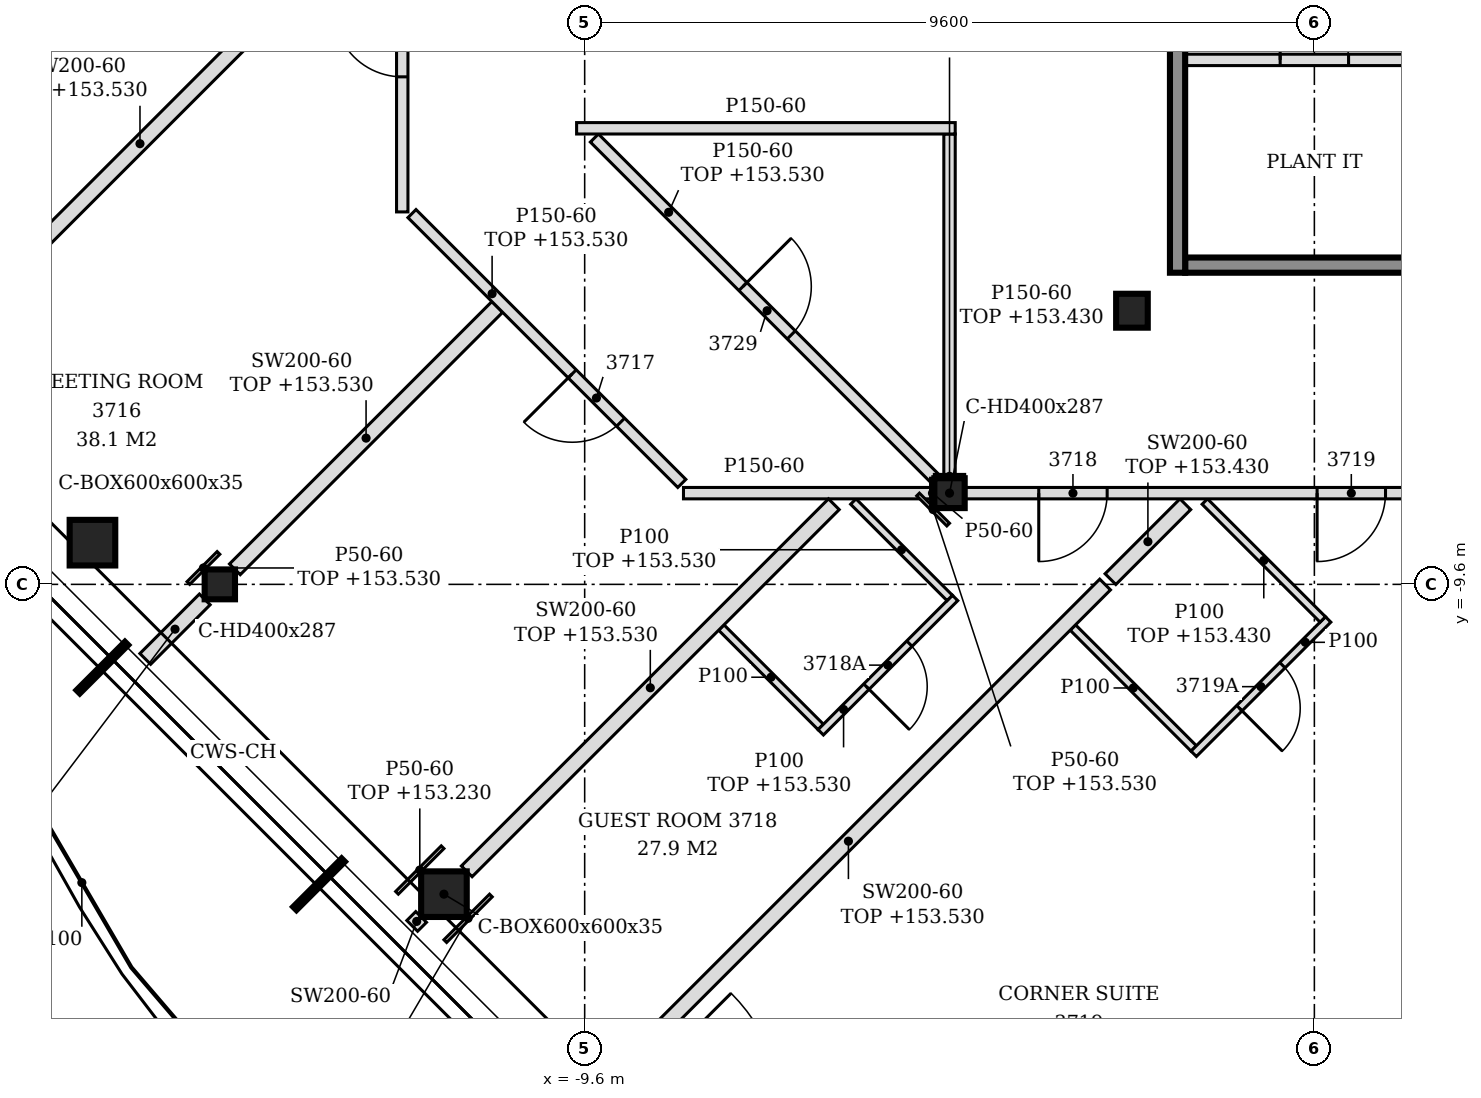
"""IFC4 building model, lengths in metres.
Left out: names, types, materials, properties, quantities, classifications, styles, units other than length and angle.
Written with IfcOpenShell. Run it as: python <this file> out.ifc"""

import sys

from ifc_helpers import new_model, si_unit, direction, frame, frame_2d, origin, origin_2d, place, context, subcontext, project, spatial, polyline, rectangle, hollow_rectangle, i_section, outline, extrude, element, fill, save


model = new_model("IFC4")
c1 = context("Model", 3, precision=1e-05, world=origin(), true_north=direction((0.0, 1.0)))
c2 = subcontext(c1, "Body", "Model", "MODEL_VIEW")
j1 = project(units=[si_unit("LENGTHUNIT", "METRE"), si_unit("PLANEANGLEUNIT", "RADIAN")], contexts=[c1])
p1 = place(None, origin())
s1 = spatial("IfcSite", under=j1, at=p1, CompositionType="ELEMENT")
p2 = place(p1, origin())
s2 = spatial("IfcBuilding", under=s1, at=p2, CompositionType="ELEMENT")
p3 = place(p2, frame((0.0, 0.0, 150.6)))
s3 = spatial("IfcBuildingStorey", under=s2, at=p3, CompositionType="ELEMENT", Elevation=150.6)
for number, where, z_axis, x_axis in (
    (1, (-16.076, -9.052, -0.15), (0.0, 0.0, 1.0), (1.0, 0.0, 0.0)),
    (2, (-11.451, -13.676, -0.15), (0.0, 0.0, 1.0), (1.0, 0.0, 0.0)),
):
    element("IfcColumn", number, at=place(p3, frame(where, z_axis=z_axis, x_axis=x_axis)), inside=s3, PredefinedType="COLUMN", context=c2, shape_type="SweptSolid", body=[
        extrude(hollow_rectangle(XDim=0.6, YDim=0.6, WallThickness=0.035, at=origin_2d()), origin(), (0.0, 0.0, 1.0), 3.6),
    ])
p4 = place(p3, frame((-4.8, -8.4, -0.15), z_axis=(0.0, 0.0, 1.0), x_axis=(1.0, 0.0, 0.0)))
e3 = element("IfcColumn", 3, at=p4, inside=s3, PredefinedType="COLUMN", context=c2, shape_type="SweptSolid", body=[
    extrude(i_section(OverallWidth=0.399, OverallDepth=0.393, WebThickness=0.023, FlangeThickness=0.037, FilletRadius=0.015, at=origin_2d()), origin(), (0.0, 0.0, 1.0), 3.6),
])
p5 = place(p3, frame((-2.4, -6.0, -0.15), z_axis=(0.0, 0.0, 1.0), x_axis=(1.0, 0.0, 0.0)))
e4 = element("IfcColumn", 4, at=p5, inside=s3, PredefinedType="COLUMN", context=c2, shape_type="SweptSolid", body=[
    extrude(i_section(OverallWidth=0.416, OverallDepth=0.446, WebThickness=0.039, FlangeThickness=0.063, FilletRadius=0.015, at=origin_2d()), origin(), (0.0, 0.0, 1.0), 3.6),
])
p6 = place(p3, frame((-14.4, -9.6, -0.15), z_axis=(0.0, 0.0, 1.0), x_axis=(1.0, 0.0, 0.0)))
e5 = element("IfcColumn", 5, at=p6, inside=s3, PredefinedType="COLUMN", context=c2, shape_type="SweptSolid", body=[
    extrude(i_section(OverallWidth=0.399, OverallDepth=0.393, WebThickness=0.023, FlangeThickness=0.037, FilletRadius=0.015, at=origin_2d()), origin(), (0.0, 0.0, 1.0), 3.6),
])
p7 = place(p3, frame((-1.7, -5.4, 0.0), z_axis=(0.0, 0.0, 1.0), x_axis=(1.0, 0.0, 0.0)))
e6 = element("IfcWall", 6, at=p7, inside=s3, PredefinedType="SOLIDWALL", context=c2, shape_type="SweptSolid", body=[
    extrude(rectangle(XDim=7.9, YDim=0.2, at=frame_2d((3.95, 0.0))), origin(), (0.0, 0.0, 1.0), 3.45),
])
p8 = place(p3, frame((-1.7, -2.7, 0.0), z_axis=(0.0, 0.0, 1.0), x_axis=(1.0, 0.0, 0.0)))
e7 = element("IfcWall", 7, at=p8, inside=s3, PredefinedType="PARTITIONING", context=c2, shape_type="SweptSolid", body=[
    extrude(rectangle(XDim=7.825, YDim=0.15, at=frame_2d((3.913, 0.0))), origin(), (0.0, 0.0, 1.0), 3.45),
])
p9 = place(p8, frame((1.25, 0.0, 0.0)))
e8 = element("IfcOpeningElement", 8, at=p9, cuts=e7, PredefinedType="OPENING", context=c2, shape_type="SweptSolid", body=[
    extrude(rectangle(XDim=0.9, YDim=2.1, at=frame_2d((0.45, 1.05))), frame((0.0, 0.085, 0.0), z_axis=(0.0, -1.0, 0.0), x_axis=(1.0, 0.0, 0.0)), (0.0, 0.0, 1.0), 0.17),
])
p10 = place(p8, frame((5.25, 0.0, 0.0)))
e9 = element("IfcOpeningElement", 9, at=p10, cuts=e7, PredefinedType="OPENING", context=c2, shape_type="SweptSolid", body=[
    extrude(rectangle(XDim=0.9, YDim=2.1, at=frame_2d((0.45, 1.05))), frame((0.0, 0.085, 0.0), z_axis=(0.0, -1.0, 0.0), x_axis=(1.0, 0.0, 0.0)), (0.0, 0.0, 1.0), 0.17),
])
p11 = place(p3, frame((-1.8, -5.5, 0.0), z_axis=(0.0, 0.0, 1.0), x_axis=(0.0, 1.0, 0.0)))
e10 = element("IfcWall", 10, at=p11, inside=s3, PredefinedType="SOLIDWALL", context=c2, shape_type="SweptSolid", body=[
    extrude(rectangle(XDim=15.8, YDim=0.2, at=frame_2d((7.9, 0.0))), origin(), (0.0, 0.0, 1.0), 3.45),
])
p12 = place(p11, frame((3.05, 0.0, 0.0)))
e11 = element("IfcOpeningElement", 11, at=p12, cuts=e10, PredefinedType="OPENING", context=c2, shape_type="SweptSolid", body=[
    extrude(rectangle(XDim=1.3, YDim=2.1, at=frame_2d((0.65, 1.05))), frame((0.0, 0.11, 0.0), z_axis=(0.0, -1.0, 0.0), x_axis=(1.0, 0.0, 0.0)), (0.0, 0.0, 1.0), 0.22),
])
p13 = place(p11, frame((11.45, 0.0, 0.0)))
e12 = element("IfcOpeningElement", 12, at=p13, cuts=e10, PredefinedType="OPENING", context=c2, shape_type="SweptSolid", body=[
    extrude(rectangle(XDim=1.3, YDim=2.1, at=frame_2d((0.65, 1.05))), frame((0.0, 0.11, 0.0), z_axis=(0.0, -1.0, 0.0), x_axis=(1.0, 0.0, 0.0)), (0.0, 0.0, 1.0), 0.22),
])
p14 = place(p3, frame((-9.507, -16.355, 0.0), z_axis=(0.0, 0.0, 1.0), x_axis=(0.707170680804, 0.707042875794, 0.0)))
e13 = element("IfcWall", 13, at=p14, inside=s3, PredefinedType="PARTITIONING", context=c2, shape_type="SweptSolid", body=[
    extrude(rectangle(XDim=9.551, YDim=0.2, at=frame_2d((4.776, 0.0))), origin(), (0.0, 0.0, 1.0), 2.93),
])
p15 = place(p3, frame((-11.869, -14.093, 0.0), z_axis=(0.0, 0.0, 1.0), x_axis=(0.707106781187, 0.707106781187, 0.0)))
e14 = element("IfcWall", 14, at=p15, inside=s3, PredefinedType="PARTITIONING", context=c2, shape_type="SweptSolid", body=[
    extrude(rectangle(XDim=0.166, YDim=0.2, at=frame_2d((0.083, 0.0))), origin(), (0.0, 0.0, 1.0), 3.45),
])
p16 = place(p3, frame((-11.152, -13.375, 0.0), z_axis=(0.0, 0.0, 1.0), x_axis=(0.707106781187, 0.707106781187, 0.0)))
e15 = element("IfcWall", 15, at=p16, inside=s3, PredefinedType="PARTITIONING", context=c2, shape_type="SweptSolid", body=[
    extrude(rectangle(XDim=6.83, YDim=0.2, at=frame_2d((3.415, 0.0))), origin(), (0.0, 0.0, 1.0), 2.93),
])
p17 = place(p3, frame((-1.587, -11.759, 0.0), z_axis=(0.0, 0.0, 1.0), x_axis=(-0.706889644159, 0.707323851557, 0.0)))
e16 = element("IfcWall", 16, at=p17, inside=s3, PredefinedType="PARTITIONING", context=c2, shape_type="SweptSolid", body=[
    extrude(rectangle(XDim=2.249, YDim=0.1, at=frame_2d((1.125, 0.0))), origin(), (0.0, 0.0, 1.0), 3.45),
])
p18 = place(p3, frame((-1.587, -11.829, 0.0), z_axis=(0.0, 0.0, 1.0), x_axis=(0.707350821469, 0.706862656651, 0.0)))
e17 = element("IfcWall", 17, at=p18, inside=s3, PredefinedType="PARTITIONING", context=c2, shape_type="SweptSolid", body=[
    extrude(rectangle(XDim=2.5, YDim=0.1, at=frame_2d((1.25, 0.0))), origin(), (0.0, 0.0, 1.0), 3.45),
])
p19 = place(p18, frame((0.85, 0.0, 0.0)))
e18 = element("IfcOpeningElement", 18, at=p19, cuts=e17, PredefinedType="OPENING", context=c2, shape_type="SweptSolid", body=[
    extrude(rectangle(XDim=0.8, YDim=2.1, at=frame_2d((0.4, 1.05))), frame((0.0, 0.06, 0.0), z_axis=(0.0, -1.0, 0.0), x_axis=(1.0, 0.0, 0.0)), (0.0, 0.0, 1.0), 0.12),
])
p20 = place(p3, frame((-6.494, -11.476, 0.0), z_axis=(0.0, 0.0, 1.0), x_axis=(-0.707106781187, 0.707106781187, 0.0)))
e19 = element("IfcWall", 19, at=p20, inside=s3, PredefinedType="PARTITIONING", context=c2, shape_type="SweptSolid", body=[
    extrude(rectangle(XDim=1.85, YDim=0.1, at=frame_2d((0.925, 0.0))), origin(), (0.0, 0.0, 1.0), 3.45),
])
p21 = place(p3, frame((-6.494, -11.546, 0.0), z_axis=(0.0, 0.0, 1.0), x_axis=(0.707106781187, 0.707106781187, 0.0)))
e20 = element("IfcWall", 20, at=p21, inside=s3, PredefinedType="PARTITIONING", context=c2, shape_type="SweptSolid", body=[
    extrude(rectangle(XDim=2.5, YDim=0.1, at=frame_2d((1.25, 0.0))), origin(), (0.0, 0.0, 1.0), 2.93),
])
p22 = place(p21, frame((0.85, 0.0, 0.0)))
e21 = element("IfcOpeningElement", 21, at=p22, cuts=e20, PredefinedType="OPENING", context=c2, shape_type="SweptSolid", body=[
    extrude(rectangle(XDim=0.8, YDim=2.1, at=frame_2d((0.4, 1.05))), frame((0.0, 0.06, 0.0), z_axis=(0.0, -1.0, 0.0), x_axis=(1.0, 0.0, 0.0)), (0.0, 0.0, 1.0), 0.12),
])
p23 = place(p3, frame((-15.381, -10.581, 0.0), z_axis=(0.0, 0.0, 1.0), x_axis=(0.707217034054, 0.706996511125, 0.0)))
e22 = element("IfcWall", 22, at=p23, inside=s3, PredefinedType="PARTITIONING", context=c2, shape_type="SweptSolid", body=[
    extrude(rectangle(XDim=1.107, YDim=0.2, at=frame_2d((0.554, 0.0))), origin(), (0.0, 0.0, 1.0), 2.63),
])
p24 = place(p3, frame((0.111, -10.062, 0.0), z_axis=(0.0, 0.0, 1.0), x_axis=(-0.70732924673, 0.706884245631, 0.0)))
e23 = element("IfcWall", 23, at=p24, inside=s3, PredefinedType="PARTITIONING", context=c2, shape_type="SweptSolid", body=[
    extrude(rectangle(XDim=2.195, YDim=0.1, at=frame_2d((1.097, 0.0))), origin(), (0.0, 0.0, 1.0), 2.83),
])
p25 = place(p3, frame((-4.797, -9.779, 0.0), z_axis=(0.0, 0.0, 1.0), x_axis=(-0.707174840937, 0.707038714885, 0.0)))
e24 = element("IfcWall", 24, at=p25, inside=s3, PredefinedType="PARTITIONING", context=c2, shape_type="SweptSolid", body=[
    extrude(rectangle(XDim=1.793, YDim=0.1, at=frame_2d((0.897, 0.0))), origin(), (0.0, 0.0, 1.0), 2.93),
])
p26 = place(p3, frame((-2.683, -9.531, 0.0), z_axis=(0.0, 0.0, 1.0), x_axis=(0.707019164958, 0.70719438656, 0.0)))
e25 = element("IfcWall", 25, at=p26, inside=s3, PredefinedType="PARTITIONING", context=c2, shape_type="SweptSolid", body=[
    extrude(rectangle(XDim=1.393, YDim=0.2, at=frame_2d((0.697, 0.0))), origin(), (0.0, 0.0, 1.0), 2.83),
])
p27 = place(p3, frame((-14.202, -9.402, 0.0), z_axis=(0.0, 0.0, 1.0), x_axis=(0.707081776084, 0.707131785404, 0.0)))
e26 = element("IfcWall", 26, at=p27, inside=s3, PredefinedType="PARTITIONING", context=c2, shape_type="SweptSolid", body=[
    extrude(rectangle(XDim=4.882, YDim=0.2, at=frame_2d((2.441, 0.0))), origin(), (0.0, 0.0, 1.0), 2.93),
])
p28 = place(p3, frame((-8.3, -8.4, 0.0), z_axis=(0.0, 0.0, 1.0), x_axis=(1.0, 0.0, 0.0)))
e27 = element("IfcWall", 27, at=p28, inside=s3, PredefinedType="PARTITIONING", context=c2, shape_type="SweptSolid", body=[
    extrude(rectangle(XDim=3.301, YDim=0.15, at=frame_2d((1.65, 0.0))), origin(), (0.0, 0.0, 1.0), 3.45),
])
p29 = place(p3, frame((-4.601, -8.4, 0.0), z_axis=(0.0, 0.0, 1.0), x_axis=(1.0, 0.0, 0.0)))
e28 = element("IfcWall", 28, at=p29, inside=s3, PredefinedType="PARTITIONING", context=c2, shape_type="SweptSolid", body=[
    extrude(rectangle(XDim=11.601, YDim=0.15, at=frame_2d((5.801, 0.0))), origin(), (0.0, 0.0, 1.0), 2.83),
])
p30 = place(p29, frame((0.974, 0.0, 0.0)))
e29 = element("IfcOpeningElement", 29, at=p30, cuts=e28, PredefinedType="OPENING", context=c2, shape_type="SweptSolid", body=[
    extrude(rectangle(XDim=0.9, YDim=2.1, at=frame_2d((0.45, 1.05))), frame((0.0, 0.085, 0.0), z_axis=(0.0, -1.0, 0.0), x_axis=(1.0, 0.0, 0.0)), (0.0, 0.0, 1.0), 0.17),
])
p31 = place(p29, frame((4.636, 0.0, 0.0)))
e30 = element("IfcOpeningElement", 30, at=p31, cuts=e28, PredefinedType="OPENING", context=c2, shape_type="SweptSolid", body=[
    extrude(rectangle(XDim=0.9, YDim=2.1, at=frame_2d((0.45, 1.05))), frame((0.0, 0.085, 0.0), z_axis=(0.0, -1.0, 0.0), x_axis=(1.0, 0.0, 0.0)), (0.0, 0.0, 1.0), 0.17),
])
p32 = place(p29, frame((8.592, 0.0, 0.0)))
e31 = element("IfcOpeningElement", 31, at=p32, cuts=e28, PredefinedType="OPENING", context=c2, shape_type="SweptSolid", body=[
    extrude(rectangle(XDim=0.9, YDim=2.1, at=frame_2d((0.45, 1.05))), frame((0.0, 0.085, 0.0), z_axis=(0.0, -1.0, 0.0), x_axis=(1.0, 0.0, 0.0)), (0.0, 0.0, 1.0), 0.17),
])
p33 = place(p3, frame((-8.322, -8.272, 0.0), z_axis=(0.0, 0.0, 1.0), x_axis=(-0.707106781187, 0.707106781187, 0.0)))
e32 = element("IfcWall", 32, at=p33, inside=s3, PredefinedType="PARTITIONING", context=c2, shape_type="SweptSolid", body=[
    extrude(rectangle(XDim=5.021, YDim=0.15, at=frame_2d((2.51, 0.0))), origin(), (0.0, 0.0, 1.0), 2.93),
])
p34 = place(p33, frame((1.139, 0.0, 0.0)))
e33 = element("IfcOpeningElement", 33, at=p34, cuts=e32, PredefinedType="OPENING", context=c2, shape_type="SweptSolid", body=[
    extrude(rectangle(XDim=0.9, YDim=2.1, at=frame_2d((0.45, 1.05))), frame((0.0, 0.085, 0.0), z_axis=(0.0, -1.0, 0.0), x_axis=(1.0, 0.0, 0.0)), (0.0, 0.0, 1.0), 0.17),
])
p35 = place(p3, frame((-4.998, -8.202, 0.0), z_axis=(0.0, 0.0, 1.0), x_axis=(-0.707106781187, 0.707106781187, 0.0)))
e34 = element("IfcWall", 34, at=p35, inside=s3, PredefinedType="PARTITIONING", context=c2, shape_type="SweptSolid", body=[
    extrude(rectangle(XDim=6.327, YDim=0.15, at=frame_2d((3.164, 0.0))), origin(), (0.0, 0.0, 1.0), 2.93),
])
p36 = place(p35, frame((2.664, 0.0, 0.0)))
e35 = element("IfcOpeningElement", 35, at=p36, cuts=e34, PredefinedType="OPENING", context=c2, shape_type="SweptSolid", body=[
    extrude(rectangle(XDim=0.9, YDim=2.1, at=frame_2d((0.45, 1.05))), frame((0.0, 0.085, 0.0), z_axis=(0.0, -1.0, 0.0), x_axis=(1.0, 0.0, 0.0)), (0.0, 0.0, 1.0), 0.17),
])
p37 = place(p3, frame((-4.8, -8.204, 0.0), z_axis=(0.0, 0.0, 1.0), x_axis=(0.0, 1.0, 0.0)))
e36 = element("IfcWall", 36, at=p37, inside=s3, PredefinedType="PARTITIONING", context=c2, shape_type="SweptSolid", body=[
    extrude(rectangle(XDim=4.529, YDim=0.15, at=frame_2d((2.264, 0.0))), origin(), (0.0, 0.0, 1.0), 2.83),
])
p38 = place(p3, frame((-18.755, -7.107, 0.0), z_axis=(0.0, 0.0, 1.0), x_axis=(0.707106781187, 0.707106781187, 0.0)))
e37 = element("IfcWall", 37, at=p38, inside=s3, PredefinedType="PARTITIONING", context=c2, shape_type="SweptSolid", body=[
    extrude(rectangle(XDim=9.347, YDim=0.2, at=frame_2d((4.674, 0.0))), origin(), (0.0, 0.0, 1.0), 2.93),
])
p39 = place(p3, frame((-12.0, -4.7, 0.0), z_axis=(0.0, 0.0, 1.0), x_axis=(0.0, 1.0, 0.0)))
e38 = element("IfcWall", 38, at=p39, inside=s3, PredefinedType="PARTITIONING", context=c2, shape_type="SweptSolid", body=[
    extrude(outline(polyline([(0.0, 0.0), (13.913, 0.0), (13.913, 3.45), (9.6, 3.45), (9.598, 2.93), (9.4, 2.93), (9.398, 3.45), (4.8, 3.45), (4.798, 2.93), (4.6, 2.93), (4.598, 3.45), (0.0, 3.45), (0.0, 0.0)])), frame((0.0, 0.075, 0.0), z_axis=(0.0, -1.0, 0.0), x_axis=(1.0, 0.0, 0.0)), (0.0, 0.0, 1.0), 0.15),
])
p40 = place(p39, frame((12.347, 0.0, 0.0)))
e39 = element("IfcOpeningElement", 39, at=p40, cuts=e38, PredefinedType="OPENING", context=c2, shape_type="SweptSolid", body=[
    extrude(rectangle(XDim=0.9, YDim=2.1, at=frame_2d((0.45, 1.05))), frame((0.0, 0.085, 0.0), z_axis=(0.0, -1.0, 0.0), x_axis=(1.0, 0.0, 0.0)), (0.0, 0.0, 1.0), 0.17),
])
p41 = place(p39, frame((5.45, 0.0, 0.0)))
e40 = element("IfcOpeningElement", 40, at=p41, cuts=e38, PredefinedType="OPENING", context=c2, shape_type="SweptSolid", body=[
    extrude(rectangle(XDim=0.9, YDim=2.1, at=frame_2d((0.45, 1.05))), frame((0.0, 0.085, 0.0), z_axis=(0.0, -1.0, 0.0), x_axis=(1.0, 0.0, 0.0)), (0.0, 0.0, 1.0), 0.17),
])
p42 = place(p39, frame((1.777, 0.0, 0.0)))
e41 = element("IfcOpeningElement", 41, at=p42, cuts=e38, PredefinedType="OPENING", context=c2, shape_type="SweptSolid", body=[
    extrude(rectangle(XDim=0.9, YDim=2.1, at=frame_2d((0.45, 1.05))), frame((0.0, 0.085, 0.0), z_axis=(0.0, -1.0, 0.0), x_axis=(1.0, 0.0, 0.0)), (0.0, 0.0, 1.0), 0.17),
])
p43 = place(p3, frame((-9.706, -3.6, 0.0), z_axis=(0.0, 0.0, 1.0), x_axis=(1.0, 0.0, 0.0)))
e42 = element("IfcWall", 42, at=p43, inside=s3, PredefinedType="PARTITIONING", context=c2, shape_type="SweptSolid", body=[
    extrude(outline(polyline([(0.0, 0.0), (4.981, 0.0), (4.981, 2.83), (4.756, 2.83), (4.754, 3.45), (0.0, 3.45), (0.0, 0.0)])), frame((0.0, 0.075, 0.0), z_axis=(0.0, -1.0, 0.0), x_axis=(1.0, 0.0, 0.0)), (0.0, 0.0, 1.0), 0.15),
])
p44 = place(p3, frame((-12.069, -13.658, 0.0), z_axis=(0.0, 0.0, 1.0), x_axis=(0.707106781187, 0.707106781187, 0.0)))
e43 = element("IfcWall", 43, at=p44, inside=s3, PredefinedType="PARTITIONING", context=c2, shape_type="SweptSolid", body=[
    extrude(rectangle(XDim=0.848, YDim=0.05, at=frame_2d((0.424, 0.0))), origin(), (0.0, 0.0, 1.0), 2.63),
])
p45 = place(p3, frame((-11.434, -14.293, 0.0), z_axis=(0.0, 0.0, 1.0), x_axis=(0.707106781187, 0.707106781187, 0.0)))
e44 = element("IfcWall", 44, at=p45, inside=s3, PredefinedType="PARTITIONING", context=c2, shape_type="SweptSolid", body=[
    extrude(rectangle(XDim=0.849, YDim=0.05, at=frame_2d((0.424, 0.0))), origin(), (0.0, 0.0, 1.0), 2.93),
])
p46 = place(p3, frame((-14.814, -9.582, 0.0), z_axis=(0.0, 0.0, 1.0), x_axis=(0.707106781187, 0.707106781187, 0.0)))
e45 = element("IfcWall", 45, at=p46, inside=s3, PredefinedType="PARTITIONING", context=c2, shape_type="SweptSolid", body=[
    extrude(rectangle(XDim=0.56, YDim=0.05, at=frame_2d((0.28, 0.0))), origin(), (0.0, 0.0, 1.0), 2.93),
])
p47 = place(p3, frame((-5.0, -8.178, 0.0), z_axis=(0.0, 0.0, 1.0), x_axis=(1.0, 0.0, 0.0)))
e46 = element("IfcWall", 46, at=p47, inside=s3, PredefinedType="PARTITIONING", context=c2, shape_type="SweptSolid", body=[
    extrude(rectangle(XDim=0.399, YDim=0.05, at=frame_2d((0.199, 0.0))), origin(), (0.0, 0.0, 1.0), 2.83),
])
p48 = place(p3, frame((-4.818, -8.814, 0.0), z_axis=(0.0, 0.0, 1.0), x_axis=(-0.707106781187, 0.707106781187, 0.0)))
e47 = element("IfcWall", 47, at=p48, inside=s3, PredefinedType="PARTITIONING", context=c2, shape_type="SweptSolid", body=[
    extrude(rectangle(XDim=0.56, YDim=0.05, at=frame_2d((0.28, 0.0))), origin(), (0.0, 0.0, 1.0), 2.93),
])
p49 = place(p3, frame((-5.024, -8.596, 0.0), z_axis=(0.0, 0.0, 1.0), x_axis=(0.0, 1.0, 0.0)))
e48 = element("IfcWall", 48, at=p49, inside=s3, PredefinedType="PARTITIONING", context=c2, shape_type="SweptSolid", body=[
    extrude(rectangle(XDim=0.393, YDim=0.05, at=frame_2d((0.196, 0.0))), origin(), (0.0, 0.0, 1.0), 3.45),
])
p50 = place(p9, origin())
e49 = element("IfcDoor", 49, at=p50, inside=s3, OperationType="SINGLE_SWING_LEFT", PredefinedType="DOOR", context=c2, shape_type="SweptSolid", body=[
    extrude(rectangle(XDim=0.9, YDim=2.1, at=frame_2d((0.45, 1.05))), frame((0.0, 0.025, 0.0), z_axis=(0.0, -1.0, 0.0), x_axis=(1.0, 0.0, 0.0)), (0.0, 0.0, 1.0), 0.05),
])
fill(e8, e49)
p51 = place(p42, origin())
e50 = element("IfcDoor", 50, at=p51, inside=s3, OperationType="SINGLE_SWING_RIGHT", PredefinedType="DOOR", context=c2, shape_type="SweptSolid", body=[
    extrude(rectangle(XDim=0.9, YDim=2.1, at=frame_2d((0.45, 1.05))), frame((0.0, 0.025, 0.0), z_axis=(0.0, -1.0, 0.0), x_axis=(1.0, 0.0, 0.0)), (0.0, 0.0, 1.0), 0.05),
])
fill(e41, e50)
p52 = place(p34, origin())
e51 = element("IfcDoor", 51, at=p52, inside=s3, OperationType="SINGLE_SWING_RIGHT", PredefinedType="DOOR", context=c2, shape_type="SweptSolid", body=[
    extrude(rectangle(XDim=0.9, YDim=2.1, at=frame_2d((0.45, 1.05))), frame((0.0, 0.025, 0.0), z_axis=(0.0, -1.0, 0.0), x_axis=(1.0, 0.0, 0.0)), (0.0, 0.0, 1.0), 0.05),
])
fill(e33, e51)
p53 = place(p30, frame((0.9, 0.0, 0.0), z_axis=(0.0, 0.0, 1.0), x_axis=(-1.0, 0.0, 0.0)))
e52 = element("IfcDoor", 52, at=p53, inside=s3, OperationType="SINGLE_SWING_RIGHT", PredefinedType="DOOR", context=c2, shape_type="SweptSolid", body=[
    extrude(rectangle(XDim=0.9, YDim=2.1, at=frame_2d((0.45, 1.05))), frame((0.0, 0.025, 0.0), z_axis=(0.0, -1.0, 0.0), x_axis=(1.0, 0.0, 0.0)), (0.0, 0.0, 1.0), 0.05),
])
fill(e29, e52)
p54 = place(p22, frame((0.8, 0.0, 0.0), z_axis=(0.0, 0.0, 1.0), x_axis=(-1.0, 0.0, 0.0)))
e53 = element("IfcDoor", 53, at=p54, inside=s3, OperationType="SINGLE_SWING_RIGHT", PredefinedType="DOOR", context=c2, shape_type="SweptSolid", body=[
    extrude(rectangle(XDim=0.8, YDim=2.1, at=frame_2d((0.4, 1.05))), frame((0.0, 0.025, 0.0), z_axis=(0.0, -1.0, 0.0), x_axis=(1.0, 0.0, 0.0)), (0.0, 0.0, 1.0), 0.05),
])
fill(e21, e53)
p55 = place(p31, frame((0.9, 0.0, 0.0), z_axis=(0.0, 0.0, 1.0), x_axis=(-1.0, 0.0, 0.0)))
e54 = element("IfcDoor", 54, at=p55, inside=s3, OperationType="SINGLE_SWING_RIGHT", PredefinedType="DOOR", context=c2, shape_type="SweptSolid", body=[
    extrude(rectangle(XDim=0.9, YDim=2.1, at=frame_2d((0.45, 1.05))), frame((0.0, 0.025, 0.0), z_axis=(0.0, -1.0, 0.0), x_axis=(1.0, 0.0, 0.0)), (0.0, 0.0, 1.0), 0.05),
])
fill(e30, e54)
p56 = place(p19, frame((0.8, 0.0, 0.0), z_axis=(0.0, 0.0, 1.0), x_axis=(-1.0, 0.0, 0.0)))
e55 = element("IfcDoor", 55, at=p56, inside=s3, OperationType="SINGLE_SWING_RIGHT", PredefinedType="DOOR", context=c2, shape_type="SweptSolid", body=[
    extrude(rectangle(XDim=0.8, YDim=2.1, at=frame_2d((0.4, 1.05))), frame((0.0, 0.025, 0.0), z_axis=(0.0, -1.0, 0.0), x_axis=(1.0, 0.0, 0.0)), (0.0, 0.0, 1.0), 0.05),
])
fill(e18, e55)
p57 = place(p36, frame((0.9, 0.0, 0.0), z_axis=(0.0, 0.0, 1.0), x_axis=(-1.0, 0.0, 0.0)))
e56 = element("IfcDoor", 56, at=p57, inside=s3, OperationType="SINGLE_SWING_LEFT", PredefinedType="DOOR", context=c2, shape_type="SweptSolid", body=[
    extrude(rectangle(XDim=0.9, YDim=2.1, at=frame_2d((0.45, 1.05))), frame((0.0, 0.025, 0.0), z_axis=(0.0, -1.0, 0.0), x_axis=(1.0, 0.0, 0.0)), (0.0, 0.0, 1.0), 0.05),
])
fill(e35, e56)
save(model, sys.argv[1])
